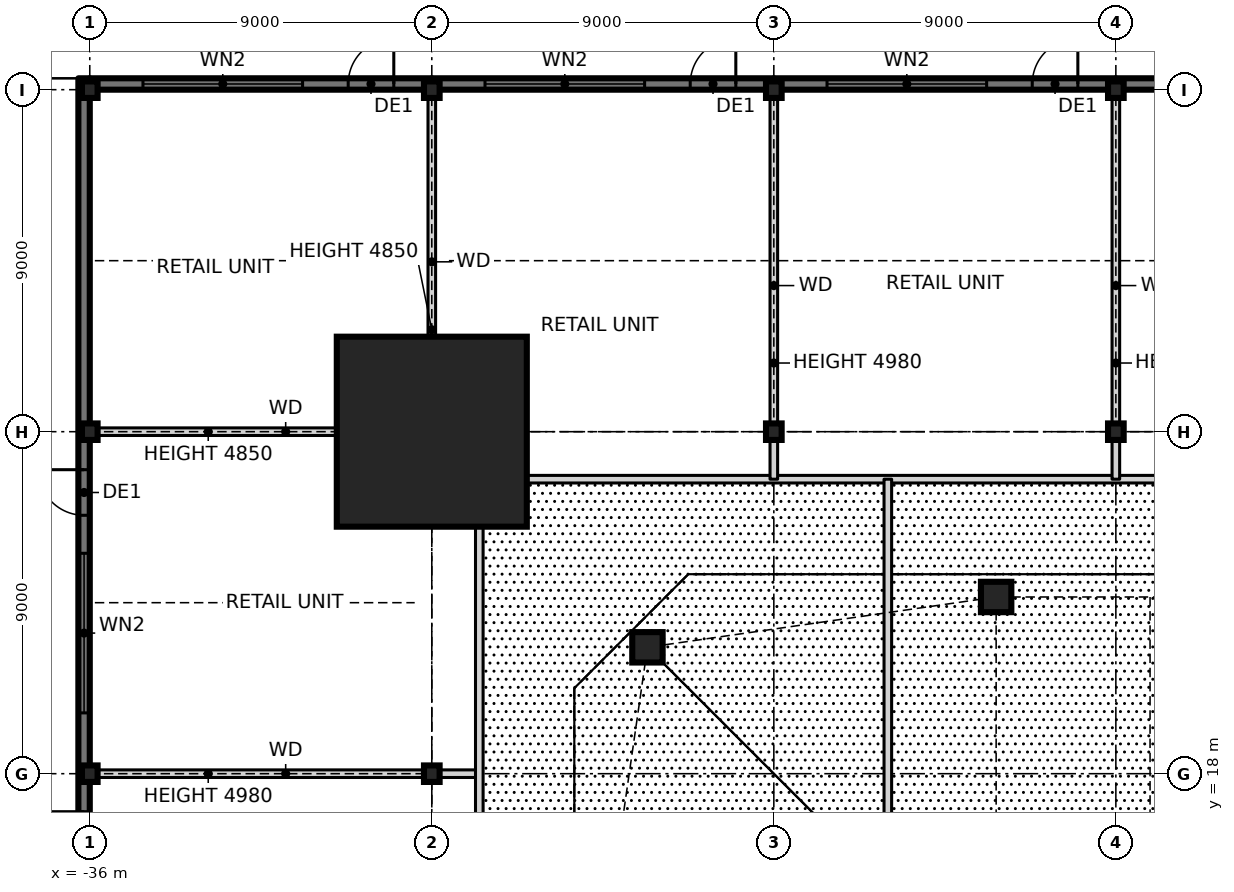
"""IFC4 building model, lengths in metres.
Left out: names, types, materials, properties, quantities, classifications, styles, units other than length and angle.
Written with IfcOpenShell. Run it as: python <this file> out.ifc"""

import sys

from ifc_helpers import new_model, si_unit, direction, frame, frame_2d, origin, origin_2d, place, context, subcontext, project, spatial, rectangle, hollow_rectangle, i_section, extrude, element, fill, save


model = new_model("IFC4")
c1 = context("Model", 3, precision=1e-05, world=origin(), true_north=direction((0.0, 1.0)))
c2 = subcontext(c1, "Body", "Model", "MODEL_VIEW")
j1 = project(units=[si_unit("LENGTHUNIT", "METRE"), si_unit("PLANEANGLEUNIT", "RADIAN")], contexts=[c1])
p1 = place(None, origin())
s1 = spatial("IfcSite", under=j1, at=p1, CompositionType="ELEMENT")
p2 = place(p1, origin())
s2 = spatial("IfcBuilding", under=s1, at=p2, CompositionType="ELEMENT")
p3 = place(p2, origin())
s3 = spatial("IfcBuildingStorey", under=s2, at=p3, CompositionType="ELEMENT", Elevation=0.0)
for number, where, z_axis, x_axis in (
    (1, (-12.15, 22.65, 0.0), (0.0, 0.0, 1.0), (1.0, 0.0, 0.0)),
    (2, (-21.326, 21.326, 0.0), (0.0, 0.0, 1.0), (1.0, 0.0, 0.0)),
):
    element("IfcColumn", number, at=place(p3, frame(where, z_axis=z_axis, x_axis=x_axis)), inside=s3, PredefinedType="COLUMN", context=c2, shape_type="SweptSolid", body=[
        extrude(hollow_rectangle(XDim=0.8, YDim=0.8, WallThickness=0.09, at=origin_2d()), origin(), (0.0, 0.0, 1.0), 6.0),
    ])
p4 = place(p3, frame((-27.0, 27.0, 0.0), z_axis=(0.0, 0.0, 1.0), x_axis=(1.0, 0.0, 0.0)))
e3 = element("IfcColumn", 3, at=p4, inside=s3, PredefinedType="COLUMN", context=c2, shape_type="SweptSolid", body=[
    extrude(rectangle(XDim=5.0, YDim=5.0, at=origin_2d()), origin(), (0.0, 0.0, 1.0), 6.0),
    extrude(i_section(OverallWidth=0.478, OverallDepth=0.599, WebThickness=0.1, FlangeThickness=0.14, at=origin_2d()), origin(), (0.0, 0.0, 1.0), 6.0),
])
for number, where, z_axis, x_axis in (
    (4, (-36.0, 18.0, 0.0), (0.0, 0.0, 1.0), (1.0, 0.0, 0.0)),
    (5, (-36.0, 27.0, 0.0), (0.0, 0.0, 1.0), (1.0, 0.0, 0.0)),
    (6, (-36.0, 36.0, 0.0), (0.0, 0.0, 1.0), (1.0, 0.0, 0.0)),
    (7, (-27.0, 18.0, 0.0), (0.0, 0.0, 1.0), (1.0, 0.0, 0.0)),
    (8, (-27.0, 36.0, 0.0), (0.0, 0.0, 1.0), (1.0, 0.0, 0.0)),
    (9, (-18.0, 27.0, 0.0), (0.0, 0.0, 1.0), (1.0, 0.0, 0.0)),
    (10, (-18.0, 36.0, 0.0), (0.0, 0.0, 1.0), (1.0, 0.0, 0.0)),
    (11, (-9.0, 27.0, 0.0), (0.0, 0.0, 1.0), (1.0, 0.0, 0.0)),
    (12, (-9.0, 36.0, 0.0), (0.0, 0.0, 1.0), (1.0, 0.0, 0.0)),
):
    element("IfcColumn", number, at=place(p3, frame(where, z_axis=z_axis, x_axis=x_axis)), inside=s3, PredefinedType="COLUMN", context=c2, shape_type="SweptSolid", body=[
        extrude(i_section(OverallWidth=0.411, OverallDepth=0.434, WebThickness=0.036, FlangeThickness=0.057, at=origin_2d()), origin(), (0.0, 0.0, 1.0), 6.0),
    ])
p5 = place(p3, frame((-27.0, 36.15, -0.25), z_axis=(0.0, 0.0, 1.0), x_axis=(-1.0, 0.0, 0.0)))
e13 = element("IfcWall", 13, at=p5, inside=s3, PredefinedType="SOLIDWALL", context=c2, shape_type="SweptSolid", body=[
    extrude(rectangle(XDim=9.0, YDim=0.3, at=frame_2d((4.5, 0.0))), origin(), (0.0, 0.0, 1.0), 6.25),
])
p6 = place(p5, frame((1.0, 0.0, 0.25)))
e14 = element("IfcOpeningElement", 14, at=p6, cuts=e13, PredefinedType="OPENING", context=c2, shape_type="SweptSolid", body=[
    extrude(rectangle(XDim=1.2, YDim=2.4, at=frame_2d((0.6, 1.2))), frame((0.0, 0.16, 0.0), z_axis=(0.0, -1.0, 0.0), x_axis=(1.0, 0.0, 0.0)), (0.0, 0.0, 1.0), 0.32),
])
p7 = place(p5, frame((3.4, 0.0, 0.85)))
e15 = element("IfcOpeningElement", 15, at=p7, cuts=e13, PredefinedType="OPENING", context=c2, shape_type="SweptSolid", body=[
    extrude(rectangle(XDim=4.2, YDim=3.6, at=frame_2d((2.1, 1.8))), frame((0.0, 0.16, 0.0), z_axis=(0.0, -1.0, 0.0), x_axis=(1.0, 0.0, 0.0)), (0.0, 0.0, 1.0), 0.32),
])
p8 = place(p3, frame((-18.0, 36.15, -0.25), z_axis=(0.0, 0.0, 1.0), x_axis=(-1.0, 0.0, 0.0)))
e16 = element("IfcWall", 16, at=p8, inside=s3, PredefinedType="SOLIDWALL", context=c2, shape_type="SweptSolid", body=[
    extrude(rectangle(XDim=9.0, YDim=0.3, at=frame_2d((4.5, 0.0))), origin(), (0.0, 0.0, 1.0), 6.25),
])
p9 = place(p8, frame((1.0, 0.0, 0.25)))
e17 = element("IfcOpeningElement", 17, at=p9, cuts=e16, PredefinedType="OPENING", context=c2, shape_type="SweptSolid", body=[
    extrude(rectangle(XDim=1.2, YDim=2.4, at=frame_2d((0.6, 1.2))), frame((0.0, 0.16, 0.0), z_axis=(0.0, -1.0, 0.0), x_axis=(1.0, 0.0, 0.0)), (0.0, 0.0, 1.0), 0.32),
])
p10 = place(p8, frame((3.4, 0.0, 0.85)))
e18 = element("IfcOpeningElement", 18, at=p10, cuts=e16, PredefinedType="OPENING", context=c2, shape_type="SweptSolid", body=[
    extrude(rectangle(XDim=4.2, YDim=3.6, at=frame_2d((2.1, 1.8))), frame((0.0, 0.16, 0.0), z_axis=(0.0, -1.0, 0.0), x_axis=(1.0, 0.0, 0.0)), (0.0, 0.0, 1.0), 0.32),
])
p11 = place(p3, frame((-9.0, 36.15, -0.25), z_axis=(0.0, 0.0, 1.0), x_axis=(-1.0, 0.0, 0.0)))
e19 = element("IfcWall", 19, at=p11, inside=s3, PredefinedType="SOLIDWALL", context=c2, shape_type="SweptSolid", body=[
    extrude(rectangle(XDim=9.0, YDim=0.3, at=frame_2d((4.5, 0.0))), origin(), (0.0, 0.0, 1.0), 6.25),
])
p12 = place(p11, frame((1.0, 0.0, 0.25)))
e20 = element("IfcOpeningElement", 20, at=p12, cuts=e19, PredefinedType="OPENING", context=c2, shape_type="SweptSolid", body=[
    extrude(rectangle(XDim=1.2, YDim=2.4, at=frame_2d((0.6, 1.2))), frame((0.0, 0.16, 0.0), z_axis=(0.0, -1.0, 0.0), x_axis=(1.0, 0.0, 0.0)), (0.0, 0.0, 1.0), 0.32),
])
p13 = place(p11, frame((3.4, 0.0, 0.85)))
e21 = element("IfcOpeningElement", 21, at=p13, cuts=e19, PredefinedType="OPENING", context=c2, shape_type="SweptSolid", body=[
    extrude(rectangle(XDim=4.2, YDim=3.6, at=frame_2d((2.1, 1.8))), frame((0.0, 0.16, 0.0), z_axis=(0.0, -1.0, 0.0), x_axis=(1.0, 0.0, 0.0)), (0.0, 0.0, 1.0), 0.32),
])
p14 = place(p3, frame((0.0, 36.15, -0.25), z_axis=(0.0, 0.0, 1.0), x_axis=(-1.0, 0.0, 0.0)))
e22 = element("IfcWall", 22, at=p14, inside=s3, PredefinedType="SOLIDWALL", context=c2, shape_type="SweptSolid", body=[
    extrude(rectangle(XDim=9.0, YDim=0.3, at=frame_2d((4.5, 0.0))), origin(), (0.0, 0.0, 1.0), 6.25),
])
p15 = place(p14, frame((1.0, 0.0, 0.25)))
e23 = element("IfcOpeningElement", 23, at=p15, cuts=e22, PredefinedType="OPENING", context=c2, shape_type="SweptSolid", body=[
    extrude(rectangle(XDim=1.2, YDim=2.4, at=frame_2d((0.6, 1.2))), frame((0.0, 0.16, 0.0), z_axis=(0.0, -1.0, 0.0), x_axis=(1.0, 0.0, 0.0)), (0.0, 0.0, 1.0), 0.32),
])
p16 = place(p14, frame((3.4, 0.0, 0.85)))
e24 = element("IfcOpeningElement", 24, at=p16, cuts=e22, PredefinedType="OPENING", context=c2, shape_type="SweptSolid", body=[
    extrude(rectangle(XDim=4.2, YDim=3.6, at=frame_2d((2.1, 1.8))), frame((0.0, 0.16, 0.0), z_axis=(0.0, -1.0, 0.0), x_axis=(1.0, 0.0, 0.0)), (0.0, 0.0, 1.0), 0.32),
])
p17 = place(p3, frame((-36.15, 36.3, -0.25), z_axis=(0.0, 0.0, 1.0), x_axis=(0.0, -1.0, 0.0)))
e25 = element("IfcWall", 25, at=p17, inside=s3, PredefinedType="SOLIDWALL", context=c2, shape_type="SweptSolid", body=[
    extrude(rectangle(XDim=72.6, YDim=0.3, at=frame_2d((36.3, 0.0))), origin(), (0.0, 0.0, 1.0), 5.23),
])
p18 = place(p17, frame((55.3, 0.0, 0.25)))
e26 = element("IfcOpeningElement", 26, at=p18, cuts=e25, PredefinedType="OPENING", context=c2, shape_type="SweptSolid", body=[
    extrude(rectangle(XDim=1.2, YDim=2.4, at=frame_2d((0.6, 1.2))), frame((0.0, 0.16, 0.0), z_axis=(0.0, -1.0, 0.0), x_axis=(1.0, 0.0, 0.0)), (0.0, 0.0, 1.0), 0.32),
])
p19 = place(p17, frame((57.5, 0.0, 0.85)))
e27 = element("IfcOpeningElement", 27, at=p19, cuts=e25, PredefinedType="OPENING", context=c2, shape_type="SweptSolid", body=[
    extrude(rectangle(XDim=4.2, YDim=3.6, at=frame_2d((2.1, 1.8))), frame((0.0, 0.16, 0.0), z_axis=(0.0, -1.0, 0.0), x_axis=(1.0, 0.0, 0.0)), (0.0, 0.0, 1.0), 0.32),
])
p20 = place(p17, frame((46.3, 0.0, 0.25)))
e28 = element("IfcOpeningElement", 28, at=p20, cuts=e25, PredefinedType="OPENING", context=c2, shape_type="SweptSolid", body=[
    extrude(rectangle(XDim=1.2, YDim=2.4, at=frame_2d((0.6, 1.2))), frame((0.0, 0.16, 0.0), z_axis=(0.0, -1.0, 0.0), x_axis=(1.0, 0.0, 0.0)), (0.0, 0.0, 1.0), 0.32),
])
p21 = place(p17, frame((48.5, 0.0, 0.85)))
e29 = element("IfcOpeningElement", 29, at=p21, cuts=e25, PredefinedType="OPENING", context=c2, shape_type="SweptSolid", body=[
    extrude(rectangle(XDim=4.2, YDim=3.6, at=frame_2d((2.1, 1.8))), frame((0.0, 0.16, 0.0), z_axis=(0.0, -1.0, 0.0), x_axis=(1.0, 0.0, 0.0)), (0.0, 0.0, 1.0), 0.32),
])
p22 = place(p17, frame((19.3, 0.0, 0.25)))
e30 = element("IfcOpeningElement", 30, at=p22, cuts=e25, PredefinedType="OPENING", context=c2, shape_type="SweptSolid", body=[
    extrude(rectangle(XDim=1.2, YDim=2.4, at=frame_2d((0.6, 1.2))), frame((0.0, 0.16, 0.0), z_axis=(0.0, -1.0, 0.0), x_axis=(1.0, 0.0, 0.0)), (0.0, 0.0, 1.0), 0.32),
])
p23 = place(p17, frame((21.5, 0.0, 0.85)))
e31 = element("IfcOpeningElement", 31, at=p23, cuts=e25, PredefinedType="OPENING", context=c2, shape_type="SweptSolid", body=[
    extrude(rectangle(XDim=4.2, YDim=3.6, at=frame_2d((2.1, 1.8))), frame((0.0, 0.16, 0.0), z_axis=(0.0, -1.0, 0.0), x_axis=(1.0, 0.0, 0.0)), (0.0, 0.0, 1.0), 0.32),
])
p24 = place(p17, frame((10.3, 0.0, 0.25)))
e32 = element("IfcOpeningElement", 32, at=p24, cuts=e25, PredefinedType="OPENING", context=c2, shape_type="SweptSolid", body=[
    extrude(rectangle(XDim=1.2, YDim=2.4, at=frame_2d((0.6, 1.2))), frame((0.0, 0.16, 0.0), z_axis=(0.0, -1.0, 0.0), x_axis=(1.0, 0.0, 0.0)), (0.0, 0.0, 1.0), 0.32),
])
p25 = place(p17, frame((12.5, 0.0, 0.85)))
e33 = element("IfcOpeningElement", 33, at=p25, cuts=e25, PredefinedType="OPENING", context=c2, shape_type="SweptSolid", body=[
    extrude(rectangle(XDim=4.2, YDim=3.6, at=frame_2d((2.1, 1.8))), frame((0.0, 0.16, 0.0), z_axis=(0.0, -1.0, 0.0), x_axis=(1.0, 0.0, 0.0)), (0.0, 0.0, 1.0), 0.32),
])
p26 = place(p17, frame((38.55, 0.0, 0.25)))
e34 = element("IfcOpeningElement", 34, at=p26, cuts=e25, PredefinedType="OPENING", context=c2, shape_type="SweptSolid", body=[
    extrude(rectangle(XDim=1.2, YDim=2.4, at=frame_2d((0.6, 1.2))), frame((0.0, 0.16, 0.0), z_axis=(0.0, -1.0, 0.0), x_axis=(1.0, 0.0, 0.0)), (0.0, 0.0, 1.0), 0.32),
])
p27 = place(p17, frame((42.3, 0.0, 0.25)))
e35 = element("IfcOpeningElement", 35, at=p27, cuts=e25, PredefinedType="OPENING", context=c2, shape_type="SweptSolid", body=[
    extrude(rectangle(XDim=1.2, YDim=2.4, at=frame_2d((0.6, 1.2))), frame((0.0, 0.16, 0.0), z_axis=(0.0, -1.0, 0.0), x_axis=(1.0, 0.0, 0.0)), (0.0, 0.0, 1.0), 0.32),
])
p28 = place(p17, frame((28.3, 0.0, 0.25)))
e36 = element("IfcOpeningElement", 36, at=p28, cuts=e25, PredefinedType="OPENING", context=c2, shape_type="SweptSolid", body=[
    extrude(rectangle(XDim=1.2, YDim=2.4, at=frame_2d((0.6, 1.2))), frame((0.0, 0.16, 0.0), z_axis=(0.0, -1.0, 0.0), x_axis=(1.0, 0.0, 0.0)), (0.0, 0.0, 1.0), 0.32),
])
p29 = place(p3, frame((-35.94, 18.0, 0.0), z_axis=(0.0, 0.0, 1.0), x_axis=(1.0, 0.0, 0.0)))
e37 = element("IfcWall", 37, at=p29, inside=s3, PredefinedType="SOLIDWALL", context=c2, shape_type="SweptSolid", body=[
    extrude(rectangle(XDim=10.19, YDim=0.2, at=frame_2d((5.095, 0.0))), origin(), (0.0, 0.0, 1.0), 4.98),
])
p30 = place(p3, frame((-25.75, 25.75, 0.0), z_axis=(0.0, 0.0, 1.0), x_axis=(1.0, 0.0, 0.0)))
e38 = element("IfcWall", 38, at=p30, inside=s3, PredefinedType="SOLIDWALL", context=c2, shape_type="SweptSolid", body=[
    extrude(rectangle(XDim=51.5, YDim=0.2, at=frame_2d((25.75, 0.0))), origin(), (0.0, 0.0, 1.0), 5.75),
])
p31 = place(p3, frame((-35.94, 27.0, 0.0), z_axis=(0.0, 0.0, 1.0), x_axis=(1.0, 0.0, 0.0)))
e39 = element("IfcWall", 39, at=p31, inside=s3, PredefinedType="SOLIDWALL", context=c2, shape_type="SweptSolid", body=[
    extrude(rectangle(XDim=10.19, YDim=0.2, at=frame_2d((5.095, 0.0))), origin(), (0.0, 0.0, 1.0), 4.85),
])
p32 = place(p3, frame((-9.0, 25.75, 0.0), z_axis=(0.0, 0.0, 1.0), x_axis=(0.0, 1.0, 0.0)))
e40 = element("IfcWall", 40, at=p32, inside=s3, PredefinedType="SOLIDWALL", context=c2, shape_type="SweptSolid", body=[
    extrude(rectangle(XDim=10.19, YDim=0.2, at=frame_2d((5.095, 0.0))), origin(), (0.0, 0.0, 1.0), 4.98),
])
p33 = place(p3, frame((-15.0, -25.75, 0.0), z_axis=(0.0, 0.0, 1.0), x_axis=(0.0, 1.0, 0.0)))
e41 = element("IfcWall", 41, at=p33, inside=s3, PredefinedType="SOLIDWALL", context=c2, shape_type="SweptSolid", body=[
    extrude(rectangle(XDim=51.5, YDim=0.2, at=frame_2d((25.75, 0.0))), origin(), (0.0, 0.0, 1.0), 5.75),
])
p34 = place(p33, frame((33.85, 0.0, 0.0)))
e42 = element("IfcOpeningElement", 42, at=p34, cuts=e41, PredefinedType="OPENING", context=c2, shape_type="SweptSolid", body=[
    extrude(rectangle(XDim=1.8, YDim=2.1, at=frame_2d((0.9, 1.05))), frame((0.0, 0.11, 0.0), z_axis=(0.0, -1.0, 0.0), x_axis=(1.0, 0.0, 0.0)), (0.0, 0.0, 1.0), 0.22),
])
p35 = place(p33, frame((24.85, 0.0, 0.0)))
e43 = element("IfcOpeningElement", 43, at=p35, cuts=e41, PredefinedType="OPENING", context=c2, shape_type="SweptSolid", body=[
    extrude(rectangle(XDim=1.8, YDim=2.1, at=frame_2d((0.9, 1.05))), frame((0.0, 0.11, 0.0), z_axis=(0.0, -1.0, 0.0), x_axis=(1.0, 0.0, 0.0)), (0.0, 0.0, 1.0), 0.22),
])
p36 = place(p33, frame((15.85, 0.0, 0.0)))
e44 = element("IfcOpeningElement", 44, at=p36, cuts=e41, PredefinedType="OPENING", context=c2, shape_type="SweptSolid", body=[
    extrude(rectangle(XDim=1.8, YDim=2.1, at=frame_2d((0.9, 1.05))), frame((0.0, 0.11, 0.0), z_axis=(0.0, -1.0, 0.0), x_axis=(1.0, 0.0, 0.0)), (0.0, 0.0, 1.0), 0.22),
])
p37 = place(p3, frame((-18.0, 25.75, 0.0), z_axis=(0.0, 0.0, 1.0), x_axis=(0.0, 1.0, 0.0)))
e45 = element("IfcWall", 45, at=p37, inside=s3, PredefinedType="SOLIDWALL", context=c2, shape_type="SweptSolid", body=[
    extrude(rectangle(XDim=10.19, YDim=0.2, at=frame_2d((5.095, 0.0))), origin(), (0.0, 0.0, 1.0), 4.98),
])
p38 = place(p3, frame((-25.75, -27.0, 0.0), z_axis=(0.0, 0.0, 1.0), x_axis=(0.0, 1.0, 0.0)))
e46 = element("IfcWall", 46, at=p38, inside=s3, PredefinedType="SOLIDWALL", context=c2, shape_type="SweptSolid", body=[
    extrude(rectangle(XDim=54.0, YDim=0.2, at=frame_2d((27.0, 0.0))), origin(), (0.0, 0.0, 1.0), 5.75),
])
p39 = place(p3, frame((-27.0, 27.0, 0.0), z_axis=(0.0, 0.0, 1.0), x_axis=(0.0, 1.0, 0.0)))
e47 = element("IfcWall", 47, at=p39, inside=s3, PredefinedType="SOLIDWALL", context=c2, shape_type="SweptSolid", body=[
    extrude(rectangle(XDim=8.94, YDim=0.2, at=frame_2d((4.47, 0.0))), origin(), (0.0, 0.0, 1.0), 4.85),
])
p40 = place(p6, frame((1.2, 0.0, 0.0), z_axis=(0.0, 0.0, 1.0), x_axis=(-1.0, 0.0, 0.0)))
e48 = element("IfcDoor", 48, at=p40, inside=s3, OperationType="SINGLE_SWING_RIGHT", PredefinedType="DOOR", context=c2, shape_type="SweptSolid", body=[
    extrude(rectangle(XDim=1.2, YDim=2.4, at=frame_2d((0.6, 1.2))), frame((0.0, 0.025, 0.0), z_axis=(0.0, -1.0, 0.0), x_axis=(1.0, 0.0, 0.0)), (0.0, 0.0, 1.0), 0.05),
])
fill(e14, e48)
p41 = place(p7, origin())
e49 = element("IfcWindow", 49, at=p41, inside=s3, PartitioningType="SINGLE_PANEL", PredefinedType="WINDOW", context=c2, shape_type="SweptSolid", body=[
    extrude(rectangle(XDim=4.2, YDim=3.6, at=frame_2d((2.1, 1.8))), frame((0.0, 0.03, 0.0), z_axis=(0.0, -1.0, 0.0), x_axis=(1.0, 0.0, 0.0)), (0.0, 0.0, 1.0), 0.06),
])
fill(e15, e49)
p42 = place(p9, frame((1.2, 0.0, 0.0), z_axis=(0.0, 0.0, 1.0), x_axis=(-1.0, 0.0, 0.0)))
e50 = element("IfcDoor", 50, at=p42, inside=s3, OperationType="SINGLE_SWING_RIGHT", PredefinedType="DOOR", context=c2, shape_type="SweptSolid", body=[
    extrude(rectangle(XDim=1.2, YDim=2.4, at=frame_2d((0.6, 1.2))), frame((0.0, 0.025, 0.0), z_axis=(0.0, -1.0, 0.0), x_axis=(1.0, 0.0, 0.0)), (0.0, 0.0, 1.0), 0.05),
])
fill(e17, e50)
p43 = place(p10, origin())
e51 = element("IfcWindow", 51, at=p43, inside=s3, PartitioningType="SINGLE_PANEL", PredefinedType="WINDOW", context=c2, shape_type="SweptSolid", body=[
    extrude(rectangle(XDim=4.2, YDim=3.6, at=frame_2d((2.1, 1.8))), frame((0.0, 0.03, 0.0), z_axis=(0.0, -1.0, 0.0), x_axis=(1.0, 0.0, 0.0)), (0.0, 0.0, 1.0), 0.06),
])
fill(e18, e51)
p44 = place(p12, frame((1.2, 0.0, 0.0), z_axis=(0.0, 0.0, 1.0), x_axis=(-1.0, 0.0, 0.0)))
e52 = element("IfcDoor", 52, at=p44, inside=s3, OperationType="SINGLE_SWING_RIGHT", PredefinedType="DOOR", context=c2, shape_type="SweptSolid", body=[
    extrude(rectangle(XDim=1.2, YDim=2.4, at=frame_2d((0.6, 1.2))), frame((0.0, 0.025, 0.0), z_axis=(0.0, -1.0, 0.0), x_axis=(1.0, 0.0, 0.0)), (0.0, 0.0, 1.0), 0.05),
])
fill(e20, e52)
p45 = place(p13, origin())
e53 = element("IfcWindow", 53, at=p45, inside=s3, PartitioningType="SINGLE_PANEL", PredefinedType="WINDOW", context=c2, shape_type="SweptSolid", body=[
    extrude(rectangle(XDim=4.2, YDim=3.6, at=frame_2d((2.1, 1.8))), frame((0.0, 0.03, 0.0), z_axis=(0.0, -1.0, 0.0), x_axis=(1.0, 0.0, 0.0)), (0.0, 0.0, 1.0), 0.06),
])
fill(e21, e53)
p46 = place(p22, frame((1.2, 0.0, 0.0), z_axis=(0.0, 0.0, 1.0), x_axis=(-1.0, 0.0, 0.0)))
e54 = element("IfcDoor", 54, at=p46, inside=s3, OperationType="SINGLE_SWING_RIGHT", PredefinedType="DOOR", context=c2, shape_type="SweptSolid", body=[
    extrude(rectangle(XDim=1.2, YDim=2.4, at=frame_2d((0.6, 1.2))), frame((0.0, 0.025, 0.0), z_axis=(0.0, -1.0, 0.0), x_axis=(1.0, 0.0, 0.0)), (0.0, 0.0, 1.0), 0.05),
])
fill(e30, e54)
p47 = place(p24, frame((1.2, 0.0, 0.0), z_axis=(0.0, 0.0, 1.0), x_axis=(-1.0, 0.0, 0.0)))
e55 = element("IfcDoor", 55, at=p47, inside=s3, OperationType="SINGLE_SWING_RIGHT", PredefinedType="DOOR", context=c2, shape_type="SweptSolid", body=[
    extrude(rectangle(XDim=1.2, YDim=2.4, at=frame_2d((0.6, 1.2))), frame((0.0, 0.025, 0.0), z_axis=(0.0, -1.0, 0.0), x_axis=(1.0, 0.0, 0.0)), (0.0, 0.0, 1.0), 0.05),
])
fill(e32, e55)
p48 = place(p25, origin())
e56 = element("IfcWindow", 56, at=p48, inside=s3, PartitioningType="SINGLE_PANEL", PredefinedType="WINDOW", context=c2, shape_type="SweptSolid", body=[
    extrude(rectangle(XDim=4.2, YDim=3.6, at=frame_2d((2.1, 1.8))), frame((0.0, 0.03, 0.0), z_axis=(0.0, -1.0, 0.0), x_axis=(1.0, 0.0, 0.0)), (0.0, 0.0, 1.0), 0.06),
])
fill(e33, e56)
save(model, sys.argv[1])
